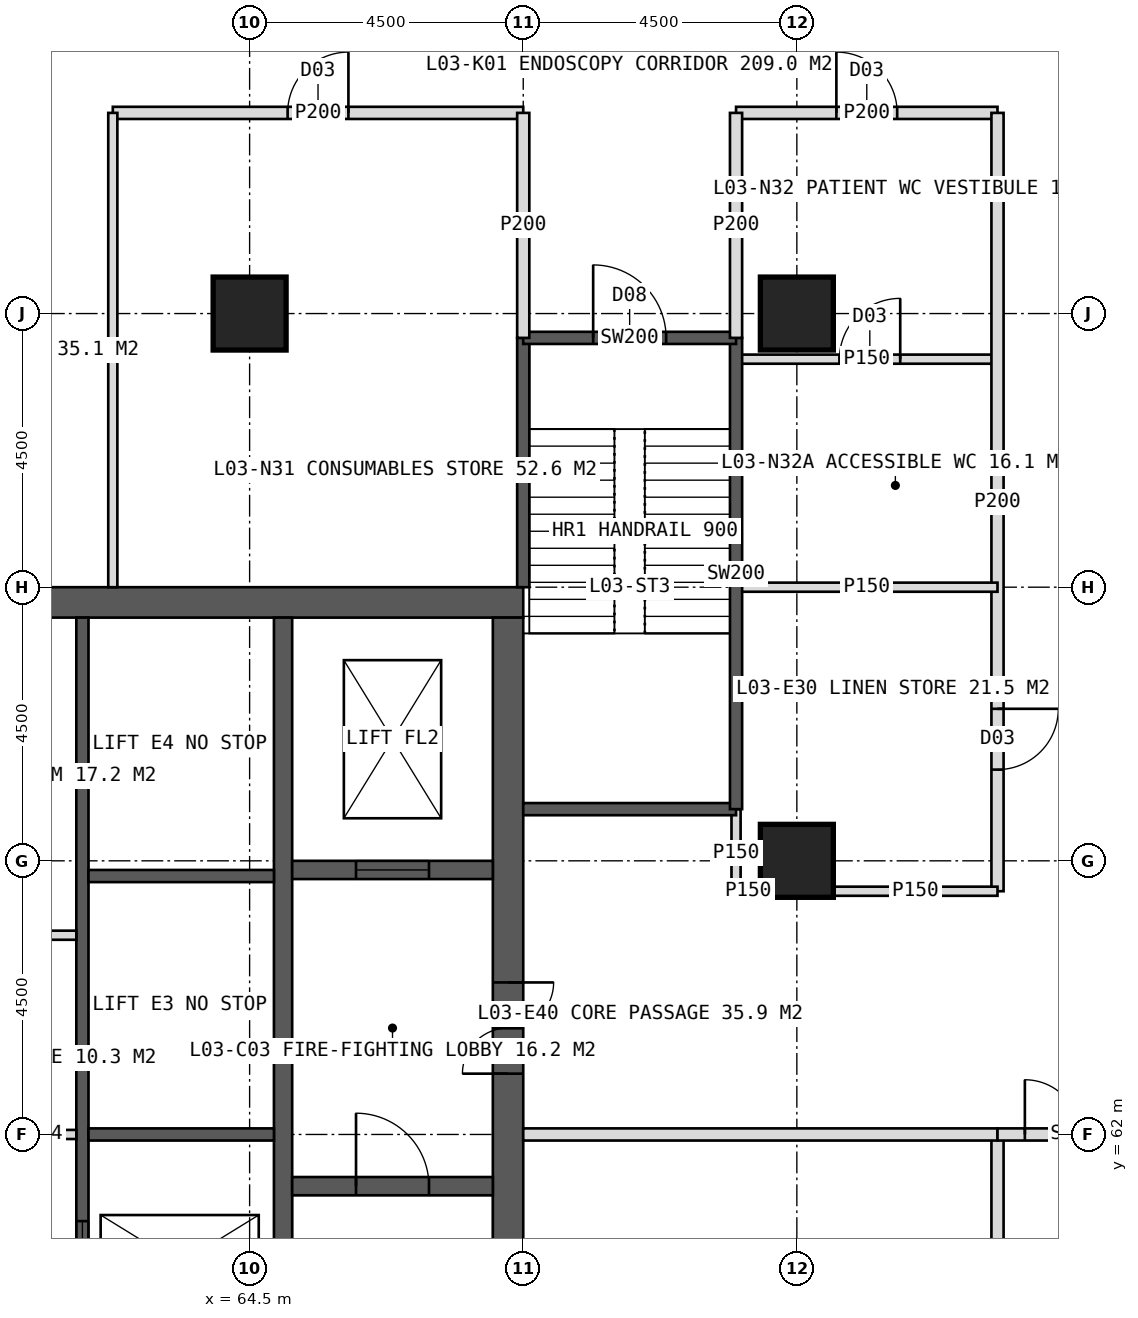
"""IFC4 building model, lengths in metres.
Left out: names, types, materials, properties, quantities, classifications, styles, units other than length and angle.
Written with IfcOpenShell. Run it as: python <this file> out.ifc"""

import sys

from ifc_helpers import new_model, si_unit, direction, frame, frame_2d, origin, origin_2d, place, context, subcontext, project, spatial, rectangle, hollow_rectangle, extrude, element, fill, save


model = new_model("IFC4")
c1 = context("Model", 3, precision=1e-05, world=origin(), true_north=direction((0.0, 1.0)))
c2 = subcontext(c1, "Body", "Model", "MODEL_VIEW")
j1 = project(units=[si_unit("LENGTHUNIT", "METRE"), si_unit("PLANEANGLEUNIT", "RADIAN")], contexts=[c1])
p1 = place(None, origin())
s1 = spatial("IfcSite", under=j1, at=p1, CompositionType="ELEMENT")
p2 = place(p1, origin())
s2 = spatial("IfcBuilding", under=s1, at=p2, CompositionType="ELEMENT")
p3 = place(p2, frame((0.0, 0.0, 16.5)))
s3 = spatial("IfcBuildingStorey", under=s2, at=p3, CompositionType="ELEMENT", Elevation=16.5)
p4 = place(p3, frame((51.0, 70.75, 0.0), z_axis=(0.0, 0.0, 1.0), x_axis=(1.0, 0.0, 0.0)))
e1 = element("IfcWall", 1, at=p4, inside=s3, PredefinedType="SHEAR", context=c2, shape_type="SweptSolid", body=[
    extrude(rectangle(XDim=18.0, YDim=0.5, at=frame_2d((9.0, 0.0))), origin(), (0.0, 0.0, 1.0), 4.5),
])
p5 = place(p4, frame((8.1, 0.0, 0.0)))
e2 = element("IfcOpeningElement", 2, at=p5, cuts=e1, PredefinedType="OPENING", context=c2, shape_type="SweptSolid", body=[
    extrude(rectangle(XDim=1.8, YDim=2.2, at=frame_2d((0.9, 1.1))), frame((0.0, 0.26, 0.0), z_axis=(0.0, -1.0, 0.0), x_axis=(1.0, 0.0, 0.0)), (0.0, 0.0, 1.0), 0.52),
])
p6 = place(p3, frame((68.75, 53.5, 0.0), z_axis=(0.0, 0.0, 1.0), x_axis=(0.0, 1.0, 0.0)))
e3 = element("IfcWall", 3, at=p6, inside=s3, PredefinedType="SHEAR", context=c2, shape_type="SweptSolid", body=[
    extrude(rectangle(XDim=17.0, YDim=0.5, at=frame_2d((8.5, 0.0))), origin(), (0.0, 0.0, 1.0), 4.5),
])
p7 = place(p6, frame((9.5, 0.0, 0.0)))
e4 = element("IfcOpeningElement", 4, at=p7, cuts=e3, PredefinedType="OPENING", context=c2, shape_type="SweptSolid", body=[
    extrude(rectangle(XDim=1.5, YDim=2.2, at=frame_2d((0.75, 1.1))), frame((0.0, 0.26, 0.0), z_axis=(0.0, -1.0, 0.0), x_axis=(1.0, 0.0, 0.0)), (0.0, 0.0, 1.0), 0.52),
])
p8 = place(p3, frame((65.05, 53.5, 0.0), z_axis=(0.0, 0.0, 1.0), x_axis=(0.0, 1.0, 0.0)))
e5 = element("IfcWall", 5, at=p8, inside=s3, PredefinedType="SHEAR", context=c2, shape_type="SweptSolid", body=[
    extrude(rectangle(XDim=17.0, YDim=0.3, at=frame_2d((8.5, 0.0))), origin(), (0.0, 0.0, 1.0), 4.5),
])
p9 = place(p3, frame((61.75, 53.5, 0.0), z_axis=(0.0, 0.0, 1.0), x_axis=(0.0, 1.0, 0.0)))
e6 = element("IfcWall", 6, at=p9, inside=s3, PredefinedType="SHEAR", context=c2, shape_type="SweptSolid", body=[
    extrude(rectangle(XDim=17.0, YDim=0.2, at=frame_2d((8.5, 0.0))), origin(), (0.0, 0.0, 1.0), 4.5),
])
p10 = place(p9, frame((1.375, 0.0, 0.0)))
e7 = element("IfcOpeningElement", 7, at=p10, cuts=e6, PredefinedType="OPENING", context=c2, shape_type="SweptSolid", body=[
    extrude(rectangle(XDim=1.4, YDim=2.2, at=frame_2d((0.7, 1.1))), frame((0.0, 0.11, 0.0), z_axis=(0.0, -1.0, 0.0), x_axis=(1.0, 0.0, 0.0)), (0.0, 0.0, 1.0), 0.22),
])
p11 = place(p9, frame((5.675, 0.0, 0.0)))
e8 = element("IfcOpeningElement", 8, at=p11, cuts=e6, PredefinedType="OPENING", context=c2, shape_type="SweptSolid", body=[
    extrude(rectangle(XDim=1.4, YDim=2.2, at=frame_2d((0.7, 1.1))), frame((0.0, 0.11, 0.0), z_axis=(0.0, -1.0, 0.0), x_axis=(1.0, 0.0, 0.0)), (0.0, 0.0, 1.0), 0.22),
])
for number, where, z_axis, x_axis in (
    (9, (61.85, 62.0, 0.0), (0.0, 0.0, 1.0), (1.0, 0.0, 0.0)),
    (10, (61.85, 66.25, 0.0), (0.0, 0.0, 1.0), (1.0, 0.0, 0.0)),
):
    element("IfcWall", number, at=place(p3, frame(where, z_axis=z_axis, x_axis=x_axis)), inside=s3, PredefinedType="SHEAR", context=c2, shape_type="SweptSolid", body=[
        extrude(rectangle(XDim=3.05, YDim=0.2, at=frame_2d((1.525, 0.0))), origin(), (0.0, 0.0, 1.0), 4.5),
    ])
p12 = place(p3, frame((65.2, 61.15, 0.0), z_axis=(0.0, 0.0, 1.0), x_axis=(1.0, 0.0, 0.0)))
e11 = element("IfcWall", 11, at=p12, inside=s3, PredefinedType="SHEAR", context=c2, shape_type="SweptSolid", body=[
    extrude(rectangle(XDim=3.3, YDim=0.3, at=frame_2d((1.65, 0.0))), origin(), (0.0, 0.0, 1.0), 4.5),
])
p13 = place(p12, frame((1.05, 0.0, 0.0)))
e12 = element("IfcOpeningElement", 12, at=p13, cuts=e11, PredefinedType="OPENING", context=c2, shape_type="SweptSolid", body=[
    extrude(rectangle(XDim=1.2, YDim=2.1, at=frame_2d((0.6, 1.05))), frame((0.0, 0.16, 0.0), z_axis=(0.0, -1.0, 0.0), x_axis=(1.0, 0.0, 0.0)), (0.0, 0.0, 1.0), 0.32),
])
p14 = place(p3, frame((65.2, 66.35, 0.0), z_axis=(0.0, 0.0, 1.0), x_axis=(1.0, 0.0, 0.0)))
e13 = element("IfcWall", 13, at=p14, inside=s3, PredefinedType="SHEAR", context=c2, shape_type="SweptSolid", body=[
    extrude(rectangle(XDim=3.3, YDim=0.3, at=frame_2d((1.65, 0.0))), origin(), (0.0, 0.0, 1.0), 4.5),
])
p15 = place(p14, frame((1.05, 0.0, 0.0)))
e14 = element("IfcOpeningElement", 14, at=p15, cuts=e13, PredefinedType="OPENING", context=c2, shape_type="SweptSolid", body=[
    extrude(rectangle(XDim=1.2, YDim=2.2, at=frame_2d((0.6, 1.1))), frame((0.0, 0.16, 0.0), z_axis=(0.0, -1.0, 0.0), x_axis=(1.0, 0.0, 0.0)), (0.0, 0.0, 1.0), 0.32),
])
for number, where, z_axis, x_axis in (
    (15, (73.5, 75.5, 0.0), (0.0, 0.0, 1.0), (1.0, 0.0, 0.0)),
    (16, (64.5, 75.5, 0.0), (0.0, 0.0, 1.0), (1.0, 0.0, 0.0)),
    (17, (73.5, 66.5, 0.0), (0.0, 0.0, 1.0), (1.0, 0.0, 0.0)),
):
    element("IfcColumn", number, at=place(p3, frame(where, z_axis=z_axis, x_axis=x_axis)), inside=s3, PredefinedType="COLUMN", context=c2, shape_type="SweptSolid", body=[
        extrude(hollow_rectangle(XDim=1.2, YDim=1.2, WallThickness=0.1, at=origin_2d()), origin(), (0.0, 0.0, 1.0), 4.5),
    ])
p16 = place(p3, frame((62.25, 78.8, 0.0), z_axis=(0.0, 0.0, 1.0), x_axis=(1.0, 0.0, 0.0)))
e18 = element("IfcWall", 18, at=p16, inside=s3, PredefinedType="PARTITIONING", context=c2, shape_type="SweptSolid", body=[
    extrude(rectangle(XDim=6.75, YDim=0.2, at=frame_2d((3.375, 0.0))), origin(), (0.0, 0.0, 1.0), 4.2),
])
p17 = place(p16, frame((2.875, 0.0, 0.0)))
e19 = element("IfcOpeningElement", 19, at=p17, cuts=e18, PredefinedType="OPENING", context=c2, shape_type="SweptSolid", body=[
    extrude(rectangle(XDim=1.0, YDim=2.1, at=frame_2d((0.5, 1.05))), frame((0.0, 0.11, 0.0), z_axis=(0.0, -1.0, 0.0), x_axis=(1.0, 0.0, 0.0)), (0.0, 0.0, 1.0), 0.22),
])
p18 = place(p3, frame((72.5, 78.8, 0.0), z_axis=(0.0, 0.0, 1.0), x_axis=(1.0, 0.0, 0.0)))
e20 = element("IfcWall", 20, at=p18, inside=s3, PredefinedType="PARTITIONING", context=c2, shape_type="SweptSolid", body=[
    extrude(rectangle(XDim=4.3, YDim=0.2, at=frame_2d((2.15, 0.0))), origin(), (0.0, 0.0, 1.0), 4.2),
])
p19 = place(p18, frame((1.65, 0.0, 0.0)))
e21 = element("IfcOpeningElement", 21, at=p19, cuts=e20, PredefinedType="OPENING", context=c2, shape_type="SweptSolid", body=[
    extrude(rectangle(XDim=1.0, YDim=2.1, at=frame_2d((0.5, 1.05))), frame((0.0, 0.11, 0.0), z_axis=(0.0, -1.0, 0.0), x_axis=(1.0, 0.0, 0.0)), (0.0, 0.0, 1.0), 0.22),
])
p20 = place(p3, frame((62.25, 71.0, 0.0), z_axis=(0.0, 0.0, 1.0), x_axis=(0.0, 1.0, 0.0)))
e22 = element("IfcWall", 22, at=p20, inside=s3, PredefinedType="PARTITIONING", context=c2, shape_type="SweptSolid", body=[
    extrude(rectangle(XDim=7.8, YDim=0.15, at=frame_2d((3.9, 0.0))), origin(), (0.0, 0.0, 1.0), 4.2),
])
p21 = place(p3, frame((72.5, 74.75, 0.0), z_axis=(0.0, 0.0, 1.0), x_axis=(1.0, 0.0, 0.0)))
e23 = element("IfcWall", 23, at=p21, inside=s3, PredefinedType="PARTITIONING", context=c2, shape_type="SweptSolid", body=[
    extrude(rectangle(XDim=4.3, YDim=0.15, at=frame_2d((2.15, 0.0))), origin(), (0.0, 0.0, 1.0), 4.2),
])
p22 = place(p21, frame((1.7, 0.0, 0.0)))
e24 = element("IfcOpeningElement", 24, at=p22, cuts=e23, PredefinedType="OPENING", context=c2, shape_type="SweptSolid", body=[
    extrude(rectangle(XDim=1.0, YDim=2.1, at=frame_2d((0.5, 1.05))), frame((0.0, 0.085, 0.0), z_axis=(0.0, -1.0, 0.0), x_axis=(1.0, 0.0, 0.0)), (0.0, 0.0, 1.0), 0.17),
])
p23 = place(p3, frame((76.8, 78.8, 0.0), z_axis=(0.0, 0.0, 1.0), x_axis=(0.0, -1.0, 0.0)))
e25 = element("IfcWall", 25, at=p23, inside=s3, PredefinedType="PARTITIONING", context=c2, shape_type="SweptSolid", body=[
    extrude(rectangle(XDim=12.8, YDim=0.2, at=frame_2d((6.4, 0.0))), origin(), (0.0, 0.0, 1.0), 4.2),
])
p24 = place(p23, frame((9.8, 0.0, 0.0)))
e26 = element("IfcOpeningElement", 26, at=p24, cuts=e25, PredefinedType="OPENING", context=c2, shape_type="SweptSolid", body=[
    extrude(rectangle(XDim=1.0, YDim=2.1, at=frame_2d((0.5, 1.05))), frame((0.0, 0.11, 0.0), z_axis=(0.0, -1.0, 0.0), x_axis=(1.0, 0.0, 0.0)), (0.0, 0.0, 1.0), 0.22),
])
p25 = place(p3, frame((76.8, 62.0, 0.0), z_axis=(0.0, 0.0, 1.0), x_axis=(0.0, -1.0, 0.0)))
e27 = element("IfcWall", 27, at=p25, inside=s3, PredefinedType="PARTITIONING", context=c2, shape_type="SweptSolid", body=[
    extrude(rectangle(XDim=16.8, YDim=0.2, at=frame_2d((8.4, 0.0))), origin(), (0.0, 0.0, 1.0), 4.2),
])
p26 = place(p25, frame((4.0, 0.0, 0.0)))
e28 = element("IfcOpeningElement", 28, at=p26, cuts=e27, PredefinedType="OPENING", context=c2, shape_type="SweptSolid", body=[
    extrude(rectangle(XDim=1.0, YDim=2.1, at=frame_2d((0.5, 1.05))), frame((0.0, 0.11, 0.0), z_axis=(0.0, -1.0, 0.0), x_axis=(1.0, 0.0, 0.0)), (0.0, 0.0, 1.0), 0.22),
])
p27 = place(p25, frame((9.75, 0.0, 0.0)))
e29 = element("IfcOpeningElement", 29, at=p27, cuts=e27, PredefinedType="OPENING", context=c2, shape_type="SweptSolid", body=[
    extrude(rectangle(XDim=0.9, YDim=2.1, at=frame_2d((0.45, 1.05))), frame((0.0, 0.11, 0.0), z_axis=(0.0, -1.0, 0.0), x_axis=(1.0, 0.0, 0.0)), (0.0, 0.0, 1.0), 0.22),
])
p28 = place(p25, frame((13.6, 0.0, 0.0)))
e30 = element("IfcOpeningElement", 30, at=p28, cuts=e27, PredefinedType="OPENING", context=c2, shape_type="SweptSolid", body=[
    extrude(rectangle(XDim=1.0, YDim=2.1, at=frame_2d((0.5, 1.05))), frame((0.0, 0.11, 0.0), z_axis=(0.0, -1.0, 0.0), x_axis=(1.0, 0.0, 0.0)), (0.0, 0.0, 1.0), 0.22),
])
p29 = place(p3, frame((72.5, 71.0, 0.0), z_axis=(0.0, 0.0, 1.0), x_axis=(1.0, 0.0, 0.0)))
e31 = element("IfcWall", 31, at=p29, inside=s3, PredefinedType="PARTITIONING", context=c2, shape_type="SweptSolid", body=[
    extrude(rectangle(XDim=4.3, YDim=0.15, at=frame_2d((2.15, 0.0))), origin(), (0.0, 0.0, 1.0), 4.2),
])
p30 = place(p3, frame((72.5, 66.0, 0.0), z_axis=(0.0, 0.0, 1.0), x_axis=(1.0, 0.0, 0.0)))
e32 = element("IfcWall", 32, at=p30, inside=s3, PredefinedType="PARTITIONING", context=c2, shape_type="SweptSolid", body=[
    extrude(rectangle(XDim=0.4, YDim=0.15, at=frame_2d((0.2, 0.0))), origin(), (0.0, 0.0, 1.0), 4.2),
])
p31 = place(p3, frame((74.1, 66.0, 0.0), z_axis=(0.0, 0.0, 1.0), x_axis=(1.0, 0.0, 0.0)))
e33 = element("IfcWall", 33, at=p31, inside=s3, PredefinedType="PARTITIONING", context=c2, shape_type="SweptSolid", body=[
    extrude(rectangle(XDim=2.7, YDim=0.15, at=frame_2d((1.35, 0.0))), origin(), (0.0, 0.0, 1.0), 4.2),
])
p32 = place(p3, frame((69.0, 62.0, 0.0), z_axis=(0.0, 0.0, 1.0), x_axis=(1.0, 0.0, 0.0)))
e34 = element("IfcWall", 34, at=p32, inside=s3, PredefinedType="SOLIDWALL", context=c2, shape_type="SweptSolid", body=[
    extrude(rectangle(XDim=7.8, YDim=0.2, at=frame_2d((3.9, 0.0))), origin(), (0.0, 0.0, 1.0), 3.4),
])
p33 = place(p3, frame((76.8, 62.0, 0.0), z_axis=(0.0, 0.0, 1.0), x_axis=(1.0, 0.0, 0.0)))
e35 = element("IfcWall", 35, at=p33, inside=s3, PredefinedType="SOLIDWALL", context=c2, shape_type="SweptSolid", body=[
    extrude(rectangle(XDim=2.7, YDim=0.2, at=frame_2d((1.35, 0.0))), origin(), (0.0, 0.0, 1.0), 3.4),
])
p34 = place(p33, frame((0.45, 0.0, 0.0)))
e36 = element("IfcOpeningElement", 36, at=p34, cuts=e35, PredefinedType="OPENING", context=c2, shape_type="SweptSolid", body=[
    extrude(rectangle(XDim=1.8, YDim=2.2, at=frame_2d((0.9, 1.1))), frame((0.0, 0.11, 0.0), z_axis=(0.0, -1.0, 0.0), x_axis=(1.0, 0.0, 0.0)), (0.0, 0.0, 1.0), 0.22),
])
p35 = place(p3, frame((58.35, 62.0, 0.0), z_axis=(0.0, 0.0, 1.0), x_axis=(1.0, 0.0, 0.0)))
e37 = element("IfcWall", 37, at=p35, inside=s3, PredefinedType="PARTITIONING", context=c2, shape_type="SweptSolid", body=[
    extrude(rectangle(XDim=3.3, YDim=0.15, at=frame_2d((1.65, 0.0))), origin(), (0.0, 0.0, 1.0), 4.2),
])
p36 = place(p35, frame((1.15, 0.0, 0.0)))
e38 = element("IfcOpeningElement", 38, at=p36, cuts=e37, PredefinedType="OPENING", context=c2, shape_type="SweptSolid", body=[
    extrude(rectangle(XDim=1.0, YDim=2.1, at=frame_2d((0.5, 1.05))), frame((0.0, 0.085, 0.0), z_axis=(0.0, -1.0, 0.0), x_axis=(1.0, 0.0, 0.0)), (0.0, 0.0, 1.0), 0.17),
])
p37 = place(p3, frame((58.35, 65.277, 0.0), z_axis=(0.0, 0.0, 1.0), x_axis=(1.0, 0.0, 0.0)))
e39 = element("IfcWall", 39, at=p37, inside=s3, PredefinedType="PARTITIONING", context=c2, shape_type="SweptSolid", body=[
    extrude(rectangle(XDim=3.3, YDim=0.15, at=frame_2d((1.65, 0.0))), origin(), (0.0, 0.0, 1.0), 4.2),
])
p38 = place(p3, frame((72.5, 65.9, 0.0), z_axis=(0.0, 0.0, 1.0), x_axis=(0.0, 1.0, 0.0)))
e40 = element("IfcWall", 40, at=p38, inside=s3, PredefinedType="PARTITIONING", context=c2, shape_type="SweptSolid", body=[
    extrude(rectangle(XDim=1.45, YDim=0.15, at=frame_2d((0.725, 0.0))), origin(), (0.0, 0.0, 1.0), 4.2),
])
p39 = place(p3, frame((69.0, 71.0, 0.0), z_axis=(0.0, 0.0, 1.0), x_axis=(0.0, 1.0, 0.0)))
e41 = element("IfcWall", 41, at=p39, inside=s3, PredefinedType="SOLIDWALL", context=c2, shape_type="SweptSolid", body=[
    extrude(rectangle(XDim=4.1, YDim=0.2, at=frame_2d((2.05, 0.0))), origin(), (0.0, 0.0, 1.0), 4.2),
])
p40 = place(p3, frame((69.0, 67.35, 0.0), z_axis=(0.0, 0.0, 1.0), x_axis=(1.0, 0.0, 0.0)))
e42 = element("IfcWall", 42, at=p40, inside=s3, PredefinedType="SOLIDWALL", context=c2, shape_type="SweptSolid", body=[
    extrude(rectangle(XDim=3.5, YDim=0.2, at=frame_2d((1.75, 0.0))), origin(), (0.0, 0.0, 1.0), 4.2),
])
p41 = place(p3, frame((72.5, 67.35, 0.0), z_axis=(0.0, 0.0, 1.0), x_axis=(0.0, 1.0, 0.0)))
e43 = element("IfcWall", 43, at=p41, inside=s3, PredefinedType="SOLIDWALL", context=c2, shape_type="SweptSolid", body=[
    extrude(rectangle(XDim=7.75, YDim=0.2, at=frame_2d((3.875, 0.0))), origin(), (0.0, 0.0, 1.0), 4.2),
])
p42 = place(p3, frame((69.0, 75.1, 0.0), z_axis=(0.0, 0.0, 1.0), x_axis=(1.0, 0.0, 0.0)))
e44 = element("IfcWall", 44, at=p42, inside=s3, PredefinedType="SOLIDWALL", context=c2, shape_type="SweptSolid", body=[
    extrude(rectangle(XDim=3.5, YDim=0.2, at=frame_2d((1.75, 0.0))), origin(), (0.0, 0.0, 1.0), 4.2),
])
p43 = place(p42, frame((1.15, 0.0, 0.0)))
e45 = element("IfcOpeningElement", 45, at=p43, cuts=e44, PredefinedType="OPENING", context=c2, shape_type="SweptSolid", body=[
    extrude(rectangle(XDim=1.2, YDim=2.1, at=frame_2d((0.6, 1.05))), frame((0.0, 0.11, 0.0), z_axis=(0.0, -1.0, 0.0), x_axis=(1.0, 0.0, 0.0)), (0.0, 0.0, 1.0), 0.22),
])
for number, where, z_axis, x_axis in (
    (46, (69.0, 75.1, 0.0), (0.0, 0.0, 1.0), (0.0, 1.0, 0.0)),
    (47, (72.5, 75.1, 0.0), (0.0, 0.0, 1.0), (0.0, 1.0, 0.0)),
):
    element("IfcWall", number, at=place(p3, frame(where, z_axis=z_axis, x_axis=x_axis)), inside=s3, PredefinedType="PARTITIONING", context=c2, shape_type="SweptSolid", body=[
        extrude(rectangle(XDim=3.7, YDim=0.2, at=frame_2d((1.85, 0.0))), origin(), (0.0, 0.0, 1.0), 4.2),
    ])
p44 = place(p17, origin())
e48 = element("IfcDoor", 48, at=p44, inside=s3, OperationType="SINGLE_SWING_RIGHT", PredefinedType="DOOR", context=c2, shape_type="SweptSolid", body=[
    extrude(rectangle(XDim=1.0, YDim=2.1, at=frame_2d((0.5, 1.05))), frame((0.0, 0.025, 0.0), z_axis=(0.0, -1.0, 0.0), x_axis=(1.0, 0.0, 0.0)), (0.0, 0.0, 1.0), 0.05),
])
fill(e19, e48)
p45 = place(p19, origin())
e49 = element("IfcDoor", 49, at=p45, inside=s3, OperationType="SINGLE_SWING_LEFT", PredefinedType="DOOR", context=c2, shape_type="SweptSolid", body=[
    extrude(rectangle(XDim=1.0, YDim=2.1, at=frame_2d((0.5, 1.05))), frame((0.0, 0.025, 0.0), z_axis=(0.0, -1.0, 0.0), x_axis=(1.0, 0.0, 0.0)), (0.0, 0.0, 1.0), 0.05),
])
fill(e21, e49)
p46 = place(p24, origin())
e50 = element("IfcDoor", 50, at=p46, inside=s3, OperationType="SINGLE_SWING_LEFT", PredefinedType="DOOR", context=c2, shape_type="SweptSolid", body=[
    extrude(rectangle(XDim=1.0, YDim=2.1, at=frame_2d((0.5, 1.05))), frame((0.0, 0.025, 0.0), z_axis=(0.0, -1.0, 0.0), x_axis=(1.0, 0.0, 0.0)), (0.0, 0.0, 1.0), 0.05),
])
fill(e26, e50)
p47 = place(p34, origin())
e51 = element("IfcDoor", 51, at=p47, inside=s3, OperationType="DOUBLE_DOOR_DOUBLE_SWING", PredefinedType="DOOR", context=c2, shape_type="SweptSolid", body=[
    extrude(rectangle(XDim=1.8, YDim=2.2, at=frame_2d((0.9, 1.1))), frame((0.0, 0.025, 0.0), z_axis=(0.0, -1.0, 0.0), x_axis=(1.0, 0.0, 0.0)), (0.0, 0.0, 1.0), 0.05),
])
fill(e36, e51)
p48 = place(p7, origin())
e52 = element("IfcDoor", 52, at=p48, inside=s3, OperationType="DOUBLE_DOOR_SINGLE_SWING", PredefinedType="DOOR", context=c2, shape_type="SweptSolid", body=[
    extrude(rectangle(XDim=1.5, YDim=2.2, at=frame_2d((0.75, 1.1))), frame((0.0, 0.025, 0.0), z_axis=(0.0, -1.0, 0.0), x_axis=(1.0, 0.0, 0.0)), (0.0, 0.0, 1.0), 0.05),
])
fill(e4, e52)
p49 = place(p13, origin())
e53 = element("IfcDoor", 53, at=p49, inside=s3, OperationType="SINGLE_SWING_LEFT", PredefinedType="DOOR", context=c2, shape_type="SweptSolid", body=[
    extrude(rectangle(XDim=1.2, YDim=2.1, at=frame_2d((0.6, 1.05))), frame((0.0, 0.025, 0.0), z_axis=(0.0, -1.0, 0.0), x_axis=(1.0, 0.0, 0.0)), (0.0, 0.0, 1.0), 0.05),
])
fill(e12, e53)
p50 = place(p15, origin())
e54 = element("IfcDoor", 54, at=p50, inside=s3, OperationType="SLIDING_TO_LEFT", PredefinedType="DOOR", context=c2, shape_type="SweptSolid", body=[
    extrude(rectangle(XDim=1.2, YDim=2.2, at=frame_2d((0.6, 1.1))), frame((0.0, 0.025, 0.0), z_axis=(0.0, -1.0, 0.0), x_axis=(1.0, 0.0, 0.0)), (0.0, 0.0, 1.0), 0.05),
])
fill(e14, e54)
p51 = place(p11, origin())
e55 = element("IfcDoor", 55, at=p51, inside=s3, OperationType="SLIDING_TO_LEFT", PredefinedType="DOOR", context=c2, shape_type="SweptSolid", body=[
    extrude(rectangle(XDim=1.4, YDim=2.2, at=frame_2d((0.7, 1.1))), frame((0.0, 0.025, 0.0), z_axis=(0.0, -1.0, 0.0), x_axis=(1.0, 0.0, 0.0)), (0.0, 0.0, 1.0), 0.05),
])
fill(e8, e55)
p52 = place(p22, origin())
e56 = element("IfcDoor", 56, at=p52, inside=s3, OperationType="SINGLE_SWING_RIGHT", PredefinedType="DOOR", context=c2, shape_type="SweptSolid", body=[
    extrude(rectangle(XDim=1.0, YDim=2.1, at=frame_2d((0.5, 1.05))), frame((0.0, 0.025, 0.0), z_axis=(0.0, -1.0, 0.0), x_axis=(1.0, 0.0, 0.0)), (0.0, 0.0, 1.0), 0.05),
])
fill(e24, e56)
p53 = place(p43, origin())
e57 = element("IfcDoor", 57, at=p53, inside=s3, OperationType="SINGLE_SWING_LEFT", PredefinedType="DOOR", context=c2, shape_type="SweptSolid", body=[
    extrude(rectangle(XDim=1.2, YDim=2.1, at=frame_2d((0.6, 1.05))), frame((0.0, 0.025, 0.0), z_axis=(0.0, -1.0, 0.0), x_axis=(1.0, 0.0, 0.0)), (0.0, 0.0, 1.0), 0.05),
])
fill(e45, e57)
save(model, sys.argv[1])
